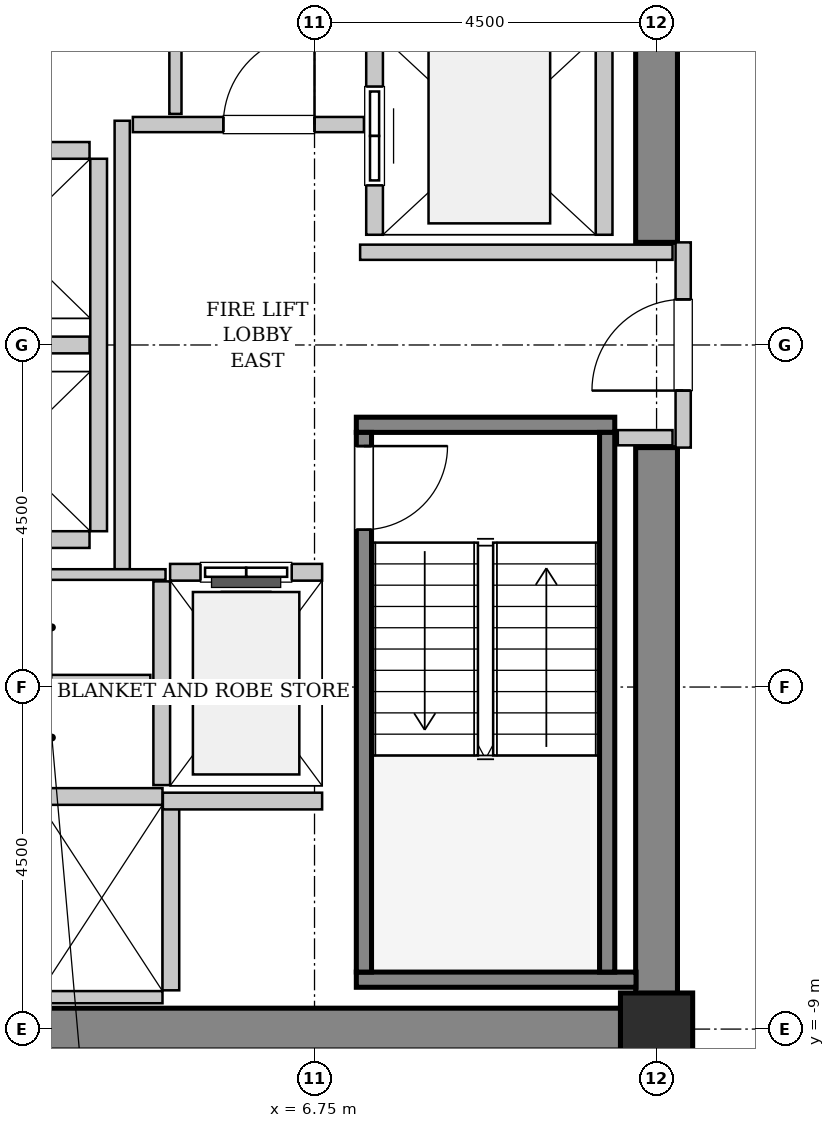
"""IFC4 building model, lengths in metres.
Left out: names, types, materials, properties, quantities, classifications, styles, units other than length and angle.
Written with IfcOpenShell. Run it as: python <this file> out.ifc"""

import sys

from ifc_helpers import new_model, si_unit, direction, frame, frame_2d, origin, origin_2d, place, context, subcontext, project, spatial, rectangle, hollow_rectangle, extrude, source, transform, mapped, element, fill, save


model = new_model("IFC4")
c1 = context("Model", 3, precision=1e-05, world=origin(), true_north=direction((0.0, 1.0)))
c2 = subcontext(c1, "Body", "Model", "MODEL_VIEW")
j1 = project(units=[si_unit("LENGTHUNIT", "METRE"), si_unit("PLANEANGLEUNIT", "RADIAN")], contexts=[c1])
p1 = place(None, origin())
s1 = spatial("IfcSite", under=j1, at=p1, CompositionType="ELEMENT")
p2 = place(p1, origin())
s2 = spatial("IfcBuilding", under=s1, at=p2, CompositionType="ELEMENT")
p3 = place(p2, frame((0.0, 0.0, 125.0)))
s3 = spatial("IfcBuildingStorey", under=s2, at=p3, CompositionType="ELEMENT", Elevation=125.0)
m1 = source(origin(), c2, "Body", "SweptSolid", [
    extrude(rectangle(XDim=9.975, YDim=0.55, at=frame_2d((4.987, 0.0))), origin(), (0.0, 0.0, 1.0), 3.8),
])
p4 = place(p3, frame((1.55, -9.0, 0.0), z_axis=(0.0, 0.0, 1.0), x_axis=(1.0, 0.0, 0.0)))
e1 = element("IfcWall", 1, at=p4, inside=s3, PredefinedType="SHEAR", context=c2, shape_type="MappedRepresentation", body=[
    mapped(m1, transform((0.0, 0.0, 0.0), x_axis=(1.0, 0.0, 0.0), y_axis=(0.0, 1.0, 0.0), z_axis=(0.0, 0.0, 1.0), scale=1.0)),
])
m2 = source(origin(), c2, "Body", "SweptSolid", [
    extrude(rectangle(XDim=7.375, YDim=0.55, at=frame_2d((3.688, 0.0))), origin(), (0.0, 0.0, 1.0), 3.8),
])
for number, where, z_axis, x_axis in (
    (2, (11.25, -8.725, 0.0), (0.0, 0.0, 1.0), (0.0, 1.0, 0.0)),
    (3, (11.25, 1.35, 0.0), (0.0, 0.0, 1.0), (0.0, 1.0, 0.0)),
):
    element("IfcWall", number, at=place(p3, frame(where, z_axis=z_axis, x_axis=x_axis)), inside=s3, PredefinedType="SHEAR", context=c2, shape_type="MappedRepresentation", body=[
        mapped(m2, transform((0.0, 0.0, 0.0), x_axis=(1.0, 0.0, 0.0), y_axis=(0.0, 1.0, 0.0), z_axis=(0.0, 0.0, 1.0), scale=1.0)),
    ])
m3 = source(origin(), c2, "Body", "SweptSolid", [
    extrude(hollow_rectangle(XDim=0.95, YDim=0.95, WallThickness=0.045, InnerFilletRadius=0.045, OuterFilletRadius=0.09, at=origin_2d()), origin(), (0.0, 0.0, 1.0), 3.8),
])
p5 = place(p3, frame((11.25, -9.0, 0.0), z_axis=(0.0, 0.0, 1.0), x_axis=(1.0, 0.0, 0.0)))
e4 = element("IfcColumn", 4, at=p5, inside=s3, PredefinedType="COLUMN", context=c2, shape_type="MappedRepresentation", body=[
    mapped(m3, transform((0.0, 0.0, 0.0), x_axis=(1.0, 0.0, 0.0), y_axis=(0.0, 1.0, 0.0), z_axis=(0.0, 0.0, 1.0), scale=1.0)),
])
m4 = source(origin(), c2, "Body", "SweptSolid", [
    extrude(rectangle(XDim=3.4, YDim=0.2, at=frame_2d((1.7, 0.0))), origin(), (0.0, 0.0, 1.0), 3.8),
])
p6 = place(p3, frame((7.3, -1.05, 0.0), z_axis=(0.0, 0.0, 1.0), x_axis=(1.0, 0.0, 0.0)))
e5 = element("IfcWall", 5, at=p6, inside=s3, PredefinedType="SOLIDWALL", context=c2, shape_type="MappedRepresentation", body=[
    mapped(m4, transform((0.0, 0.0, 0.0), x_axis=(1.0, 0.0, 0.0), y_axis=(0.0, 1.0, 0.0), z_axis=(0.0, 0.0, 1.0), scale=1.0)),
])
m5 = source(origin(), c2, "Body", "SweptSolid", [
    extrude(rectangle(XDim=3.68, YDim=0.2, at=frame_2d((1.84, 0.0))), origin(), (0.0, 0.0, 1.0), 3.8),
])
p7 = place(p3, frame((7.3, -8.35, 0.0), z_axis=(0.0, 0.0, 1.0), x_axis=(1.0, 0.0, 0.0)))
e6 = element("IfcWall", 6, at=p7, inside=s3, PredefinedType="SOLIDWALL", context=c2, shape_type="MappedRepresentation", body=[
    mapped(m5, transform((0.0, 0.0, 0.0), x_axis=(1.0, 0.0, 0.0), y_axis=(0.0, 1.0, 0.0), z_axis=(0.0, 0.0, 1.0), scale=1.0)),
])
m6 = source(origin(), c2, "Body", "SweptSolid", [
    extrude(rectangle(XDim=7.1, YDim=0.2, at=frame_2d((3.55, 0.0))), origin(), (0.0, 0.0, 1.0), 3.8),
])
p8 = place(p3, frame((7.4, -1.15, 0.0), z_axis=(0.0, 0.0, 1.0), x_axis=(0.0, -1.0, 0.0)))
e7 = element("IfcWall", 7, at=p8, inside=s3, PredefinedType="SOLIDWALL", context=c2, shape_type="MappedRepresentation", body=[
    mapped(m6, transform((0.0, 0.0, 0.0), x_axis=(1.0, 0.0, 0.0), y_axis=(0.0, 1.0, 0.0), z_axis=(0.0, 0.0, 1.0), scale=1.0)),
])
p9 = place(p8, frame((0.18, 0.0, 0.0)))
e8 = element("IfcOpeningElement", 8, at=p9, cuts=e7, PredefinedType="OPENING", context=c2, shape_type="SweptSolid", body=[
    extrude(rectangle(XDim=1.1, YDim=2.15, at=frame_2d((0.55, 1.075))), frame((0.0, 0.11, 0.0), z_axis=(0.0, -1.0, 0.0), x_axis=(1.0, 0.0, 0.0)), (0.0, 0.0, 1.0), 0.22),
])
p10 = place(p3, frame((10.6, -1.15, 0.0), z_axis=(0.0, 0.0, 1.0), x_axis=(0.0, -1.0, 0.0)))
e9 = element("IfcWall", 9, at=p10, inside=s3, PredefinedType="SOLIDWALL", context=c2, shape_type="MappedRepresentation", body=[
    mapped(m6, transform((0.0, 0.0, 0.0), x_axis=(1.0, 0.0, 0.0), y_axis=(0.0, 1.0, 0.0), z_axis=(0.0, 0.0, 1.0), scale=1.0)),
])
m7 = source(origin(), c2, "Body", "SweptSolid", [
    extrude(rectangle(XDim=2.0, YDim=0.22, at=frame_2d((1.0, 0.0))), origin(), (0.0, 0.0, 1.0), 3.535),
])
p11 = place(p3, frame((6.85, -2.99, 0.0), z_axis=(0.0, 0.0, 1.0), x_axis=(-1.0, 0.0, 0.0)))
e10 = element("IfcWall", 10, at=p11, inside=s3, PredefinedType="SOLIDWALL", context=c2, shape_type="MappedRepresentation", body=[
    mapped(m7, transform((0.0, 0.0, 0.0), x_axis=(1.0, 0.0, 0.0), y_axis=(0.0, 1.0, 0.0), z_axis=(0.0, 0.0, 1.0), scale=1.0)),
])
p12 = place(p11, frame((0.4, 0.0, 0.0)))
e11 = element("IfcOpeningElement", 11, at=p12, cuts=e10, PredefinedType="OPENING", context=c2, shape_type="SweptSolid", body=[
    extrude(rectangle(XDim=1.2, YDim=2.2, at=frame_2d((0.6, 1.1))), frame((0.0, 0.12, 0.0), z_axis=(0.0, -1.0, 0.0), x_axis=(1.0, 0.0, 0.0)), (0.0, 0.0, 1.0), 0.24),
])
m8 = source(origin(), c2, "Body", "SweptSolid", [
    extrude(rectangle(XDim=2.68, YDim=0.22, at=frame_2d((1.34, 0.0))), origin(), (0.0, 0.0, 1.0), 3.535),
])
p13 = place(p3, frame((4.74, -3.11, 0.0), z_axis=(0.0, 0.0, 1.0), x_axis=(0.0, -1.0, 0.0)))
e12 = element("IfcWall", 12, at=p13, inside=s3, PredefinedType="SOLIDWALL", context=c2, shape_type="MappedRepresentation", body=[
    mapped(m8, transform((0.0, 0.0, 0.0), x_axis=(1.0, 0.0, 0.0), y_axis=(0.0, 1.0, 0.0), z_axis=(0.0, 0.0, 1.0), scale=1.0)),
])
m9 = source(origin(), c2, "Body", "SweptSolid", [
    extrude(rectangle(XDim=5.45, YDim=0.22, at=frame_2d((2.725, 0.0))), origin(), (0.0, 0.0, 1.0), 3.535),
])
p14 = place(p3, frame((7.54, 6.9, 0.0), z_axis=(0.0, 0.0, 1.0), x_axis=(0.0, -1.0, 0.0)))
e13 = element("IfcWall", 13, at=p14, inside=s3, PredefinedType="SOLIDWALL", context=c2, shape_type="MappedRepresentation", body=[
    mapped(m9, transform((0.0, 0.0, 0.0), x_axis=(1.0, 0.0, 0.0), y_axis=(0.0, 1.0, 0.0), z_axis=(0.0, 0.0, 1.0), scale=1.0)),
])
p15 = place(p14, frame((3.5, 0.0, 0.0)))
e14 = element("IfcOpeningElement", 14, at=p15, cuts=e13, PredefinedType="OPENING", context=c2, shape_type="SweptSolid", body=[
    extrude(rectangle(XDim=1.3, YDim=2.3, at=frame_2d((0.65, 1.15))), frame((0.0, 0.12, 0.0), z_axis=(0.0, -1.0, 0.0), x_axis=(1.0, 0.0, 0.0)), (0.0, 0.0, 1.0), 0.24),
])
p16 = place(p14, frame((0.65, 0.0, 0.0)))
e15 = element("IfcOpeningElement", 15, at=p16, cuts=e13, PredefinedType="OPENING", context=c2, shape_type="SweptSolid", body=[
    extrude(rectangle(XDim=1.3, YDim=2.3, at=frame_2d((0.65, 1.15))), frame((0.0, 0.12, 0.0), z_axis=(0.0, -1.0, 0.0), x_axis=(1.0, 0.0, 0.0)), (0.0, 0.0, 1.0), 0.24),
])
p17 = place(p3, frame((10.56, 1.45, 0.0), z_axis=(0.0, 0.0, 1.0), x_axis=(0.0, 1.0, 0.0)))
e16 = element("IfcWall", 16, at=p17, inside=s3, PredefinedType="SOLIDWALL", context=c2, shape_type="MappedRepresentation", body=[
    mapped(m9, transform((0.0, 0.0, 0.0), x_axis=(1.0, 0.0, 0.0), y_axis=(0.0, 1.0, 0.0), z_axis=(0.0, 0.0, 1.0), scale=1.0)),
])
m10 = source(origin(), c2, "Body", "SweptSolid", [
    extrude(rectangle(XDim=3.2, YDim=0.22, at=frame_2d((1.6, 0.0))), origin(), (0.0, 0.0, 1.0), 3.535),
])
p18 = place(p3, frame((4.75, -5.94, 0.0), z_axis=(0.0, 0.0, 1.0), x_axis=(-1.0, 0.0, 0.0)))
e17 = element("IfcWall", 17, at=p18, inside=s3, PredefinedType="SOLIDWALL", context=c2, shape_type="MappedRepresentation", body=[
    mapped(m10, transform((0.0, 0.0, 0.0), x_axis=(1.0, 0.0, 0.0), y_axis=(0.0, 1.0, 0.0), z_axis=(0.0, 0.0, 1.0), scale=1.0)),
])
m11 = source(origin(), c2, "Body", "SweptSolid", [
    extrude(rectangle(XDim=3.2, YDim=0.16, at=frame_2d((1.6, 0.0))), origin(), (0.0, 0.0, 1.0), 2.425),
])
p19 = place(p3, frame((1.55, -8.58, 0.0), z_axis=(0.0, 0.0, 1.0), x_axis=(1.0, 0.0, 0.0)))
e18 = element("IfcWall", 18, at=p19, inside=s3, PredefinedType="PARTITIONING", context=c2, shape_type="MappedRepresentation", body=[
    mapped(m11, transform((0.0, 0.0, 0.0), x_axis=(1.0, 0.0, 0.0), y_axis=(0.0, 1.0, 0.0), z_axis=(0.0, 0.0, 1.0), scale=1.0)),
])
m12 = source(origin(), c2, "Body", "SweptSolid", [
    extrude(rectangle(XDim=2.43, YDim=0.22, at=frame_2d((1.215, 0.0))), origin(), (0.0, 0.0, 1.0), 3.535),
])
p20 = place(p3, frame((4.86, -8.49, 0.0), z_axis=(0.0, 0.0, 1.0), x_axis=(0.0, 1.0, 0.0)))
e19 = element("IfcWall", 19, at=p20, inside=s3, PredefinedType="SOLIDWALL", context=c2, shape_type="MappedRepresentation", body=[
    mapped(m12, transform((0.0, 0.0, 0.0), x_axis=(1.0, 0.0, 0.0), y_axis=(0.0, 1.0, 0.0), z_axis=(0.0, 0.0, 1.0), scale=1.0)),
])
m13 = source(origin(), c2, "Body", "SweptSolid", [
    extrude(rectangle(XDim=4.9, YDim=0.22, at=frame_2d((2.45, 0.0))), origin(), (0.0, 0.0, 1.0), 3.535),
])
p21 = place(p3, frame((3.91, -2.45, 0.0), z_axis=(0.0, 0.0, 1.0), x_axis=(0.0, 1.0, 0.0)))
e20 = element("IfcWall", 20, at=p21, inside=s3, PredefinedType="SOLIDWALL", context=c2, shape_type="MappedRepresentation", body=[
    mapped(m13, transform((0.0, 0.0, 0.0), x_axis=(1.0, 0.0, 0.0), y_axis=(0.0, 1.0, 0.0), z_axis=(0.0, 0.0, 1.0), scale=1.0)),
])
m14 = source(origin(), c2, "Body", "SweptSolid", [
    extrude(rectangle(XDim=2.13, YDim=0.22, at=frame_2d((1.065, 0.0))), origin(), (0.0, 0.0, 1.0), 3.535),
])
for number, where, z_axis, x_axis in (
    (21, (1.66, -2.56, 0.0), (0.0, 0.0, 1.0), (1.0, 0.0, 0.0)),
    (22, (1.66, 0.0, 0.0), (0.0, 0.0, 1.0), (1.0, 0.0, 0.0)),
    (23, (3.79, 2.56, 0.0), (0.0, 0.0, 1.0), (-1.0, 0.0, 0.0)),
):
    element("IfcWall", number, at=place(p3, frame(where, z_axis=z_axis, x_axis=x_axis)), inside=s3, PredefinedType="SOLIDWALL", context=c2, shape_type="MappedRepresentation", body=[
        mapped(m14, transform((0.0, 0.0, 0.0), x_axis=(1.0, 0.0, 0.0), y_axis=(0.0, 1.0, 0.0), z_axis=(0.0, 0.0, 1.0), scale=1.0)),
    ])
m15 = source(origin(), c2, "Body", "SweptSolid", [
    extrude(rectangle(XDim=2.095, YDim=0.22, at=frame_2d((1.048, 0.0))), origin(), (0.0, 0.0, 1.0), 3.535),
])
p22 = place(p3, frame((4.755, -6.0, 0.0), z_axis=(0.0, 0.0, 1.0), x_axis=(1.0, 0.0, 0.0)))
e24 = element("IfcWall", 24, at=p22, inside=s3, PredefinedType="SOLIDWALL", context=c2, shape_type="MappedRepresentation", body=[
    mapped(m15, transform((0.0, 0.0, 0.0), x_axis=(1.0, 0.0, 0.0), y_axis=(0.0, 1.0, 0.0), z_axis=(0.0, 0.0, 1.0), scale=1.0)),
])
m16 = source(origin(), c2, "Body", "SweptSolid", [
    extrude(rectangle(XDim=2.7, YDim=0.2, at=frame_2d((1.35, 0.0))), origin(), (0.0, 0.0, 1.0), 2.425),
])
p23 = place(p3, frame((11.6, -1.35, 0.0), z_axis=(0.0, 0.0, 1.0), x_axis=(0.0, 1.0, 0.0)))
e25 = element("IfcWall", 25, at=p23, inside=s3, PredefinedType="PARTITIONING", context=c2, shape_type="MappedRepresentation", body=[
    mapped(m16, transform((0.0, 0.0, 0.0), x_axis=(1.0, 0.0, 0.0), y_axis=(0.0, 1.0, 0.0), z_axis=(0.0, 0.0, 1.0), scale=1.0)),
])
p24 = place(p23, frame((0.75, 0.0, 0.0)))
e26 = element("IfcOpeningElement", 26, at=p24, cuts=e25, PredefinedType="OPENING", context=c2, shape_type="SweptSolid", body=[
    extrude(rectangle(XDim=1.2, YDim=2.15, at=frame_2d((0.6, 1.075))), frame((0.0, 0.11, 0.0), z_axis=(0.0, -1.0, 0.0), x_axis=(1.0, 0.0, 0.0)), (0.0, 0.0, 1.0), 0.22),
])
m17 = source(origin(), c2, "Body", "SweptSolid", [
    extrude(rectangle(XDim=5.9, YDim=0.2, at=frame_2d((2.95, 0.0))), origin(), (0.0, 0.0, 1.0), 3.535),
])
p25 = place(p3, frame((4.22, -2.95, 0.0), z_axis=(0.0, 0.0, 1.0), x_axis=(0.0, 1.0, 0.0)))
e27 = element("IfcWall", 27, at=p25, inside=s3, PredefinedType="PARTITIONING", context=c2, shape_type="MappedRepresentation", body=[
    mapped(m17, transform((0.0, 0.0, 0.0), x_axis=(1.0, 0.0, 0.0), y_axis=(0.0, 1.0, 0.0), z_axis=(0.0, 0.0, 1.0), scale=1.0)),
])
m18 = source(origin(), c2, "Body", "SweptSolid", [
    extrude(rectangle(XDim=3.04, YDim=0.2, at=frame_2d((1.52, 0.0))), origin(), (0.0, 0.0, 1.0), 3.535),
])
p26 = place(p3, frame((4.36, 2.9, 0.0), z_axis=(0.0, 0.0, 1.0), x_axis=(1.0, 0.0, 0.0)))
e28 = element("IfcWall", 28, at=p26, inside=s3, PredefinedType="PARTITIONING", context=c2, shape_type="MappedRepresentation", body=[
    mapped(m18, transform((0.0, 0.0, 0.0), x_axis=(1.0, 0.0, 0.0), y_axis=(0.0, 1.0, 0.0), z_axis=(0.0, 0.0, 1.0), scale=1.0)),
])
p27 = place(p26, frame((1.19, 0.0, 0.0)))
e29 = element("IfcOpeningElement", 29, at=p27, cuts=e28, PredefinedType="OPENING", context=c2, shape_type="SweptSolid", body=[
    extrude(rectangle(XDim=1.2, YDim=2.15, at=frame_2d((0.6, 1.075))), frame((0.0, 0.11, 0.0), z_axis=(0.0, -1.0, 0.0), x_axis=(1.0, 0.0, 0.0)), (0.0, 0.0, 1.0), 0.22),
])
m19 = source(origin(), c2, "Body", "SweptSolid", [
    extrude(rectangle(XDim=4.11, YDim=0.2, at=frame_2d((2.055, 0.0))), origin(), (0.0, 0.0, 1.0), 3.535),
])
p28 = place(p3, frame((7.35, 1.22, 0.0), z_axis=(0.0, 0.0, 1.0), x_axis=(1.0, 0.0, 0.0)))
e30 = element("IfcWall", 30, at=p28, inside=s3, PredefinedType="PARTITIONING", context=c2, shape_type="MappedRepresentation", body=[
    mapped(m19, transform((0.0, 0.0, 0.0), x_axis=(1.0, 0.0, 0.0), y_axis=(0.0, 1.0, 0.0), z_axis=(0.0, 0.0, 1.0), scale=1.0)),
])
m20 = source(origin(), c2, "Body", "SweptSolid", [
    extrude(rectangle(XDim=0.72, YDim=0.2, at=frame_2d((0.36, 0.0))), origin(), (0.0, 0.0, 1.0), 3.535),
])
p29 = place(p3, frame((10.74, -1.22, 0.0), z_axis=(0.0, 0.0, 1.0), x_axis=(1.0, 0.0, 0.0)))
e31 = element("IfcWall", 31, at=p29, inside=s3, PredefinedType="PARTITIONING", context=c2, shape_type="MappedRepresentation", body=[
    mapped(m20, transform((0.0, 0.0, 0.0), x_axis=(1.0, 0.0, 0.0), y_axis=(0.0, 1.0, 0.0), z_axis=(0.0, 0.0, 1.0), scale=1.0)),
])
m21 = source(origin(), c2, "Body", "SweptSolid", [
    extrude(rectangle(XDim=3.015, YDim=0.16, at=frame_2d((1.507, 0.0))), origin(), (0.0, 0.0, 1.0), 3.535),
])
p30 = place(p3, frame((4.92, 3.04, 0.0), z_axis=(0.0, 0.0, 1.0), x_axis=(0.0, 1.0, 0.0)))
e32 = element("IfcWall", 32, at=p30, inside=s3, PredefinedType="PARTITIONING", context=c2, shape_type="MappedRepresentation", body=[
    mapped(m21, transform((0.0, 0.0, 0.0), x_axis=(1.0, 0.0, 0.0), y_axis=(0.0, 1.0, 0.0), z_axis=(0.0, 0.0, 1.0), scale=1.0)),
])
m22 = source(origin(), c2, "Body", "SweptSolid", [
    extrude(rectangle(XDim=3.15, YDim=0.14, at=frame_2d((1.575, 0.0))), origin(), (0.0, 0.0, 1.0), 3.535),
])
p31 = place(p3, frame((1.64, -3.02, 0.0), z_axis=(0.0, 0.0, 1.0), x_axis=(1.0, 0.0, 0.0)))
e33 = element("IfcWall", 33, at=p31, inside=s3, PredefinedType="PARTITIONING", context=c2, shape_type="MappedRepresentation", body=[
    mapped(m22, transform((0.0, 0.0, 0.0), x_axis=(1.0, 0.0, 0.0), y_axis=(0.0, 1.0, 0.0), z_axis=(0.0, 0.0, 1.0), scale=1.0)),
])
m23 = source(origin(), c2, "Body", "SweptSolid", [
    extrude(rectangle(XDim=2.95, YDim=0.14, at=frame_2d((1.475, 0.0))), origin(), (0.0, 0.0, 1.0), 3.535),
])
p32 = place(p3, frame((1.64, -4.41, 0.0), z_axis=(0.0, 0.0, 1.0), x_axis=(1.0, 0.0, 0.0)))
e34 = element("IfcWall", 34, at=p32, inside=s3, PredefinedType="PARTITIONING", context=c2, shape_type="MappedRepresentation", body=[
    mapped(m23, transform((0.0, 0.0, 0.0), x_axis=(1.0, 0.0, 0.0), y_axis=(0.0, 1.0, 0.0), z_axis=(0.0, 0.0, 1.0), scale=1.0)),
])
m24 = source(origin(), c2, "Body", "SweptSolid", [
    extrude(rectangle(XDim=1.1, YDim=2.15, at=frame_2d((0.55, 1.075))), frame((0.0, 0.025, 0.0), z_axis=(0.0, -1.0, 0.0), x_axis=(1.0, 0.0, 0.0)), (0.0, 0.0, 1.0), 0.05),
])
p33 = place(p9, origin())
e35 = element("IfcDoor", 35, at=p33, inside=s3, OperationType="SINGLE_SWING_LEFT", PredefinedType="DOOR", context=c2, shape_type="MappedRepresentation", body=[
    mapped(m24, transform((0.0, 0.0, 0.0), x_axis=(1.0, 0.0, 0.0), y_axis=(0.0, 1.0, 0.0), z_axis=(0.0, 0.0, 1.0), scale=1.0)),
])
fill(e8, e35)
m25 = source(origin(), c2, "Body", "SweptSolid", [
    extrude(rectangle(XDim=1.2, YDim=2.2, at=frame_2d((0.6, 1.1))), frame((0.0, 0.025, 0.0), z_axis=(0.0, -1.0, 0.0), x_axis=(1.0, 0.0, 0.0)), (0.0, 0.0, 1.0), 0.05),
])
p34 = place(p12, origin())
e36 = element("IfcDoor", 36, at=p34, inside=s3, OperationType="SLIDING_TO_LEFT", PredefinedType="DOOR", context=c2, shape_type="MappedRepresentation", body=[
    mapped(m25, transform((0.0, 0.0, 0.0), x_axis=(1.0, 0.0, 0.0), y_axis=(0.0, 1.0, 0.0), z_axis=(0.0, 0.0, 1.0), scale=1.0)),
])
fill(e11, e36)
m26 = source(origin(), c2, "Body", "SweptSolid", [
    extrude(rectangle(XDim=1.3, YDim=2.3, at=frame_2d((0.65, 1.15))), frame((0.0, 0.025, 0.0), z_axis=(0.0, -1.0, 0.0), x_axis=(1.0, 0.0, 0.0)), (0.0, 0.0, 1.0), 0.05),
])
p35 = place(p15, origin())
e37 = element("IfcDoor", 37, at=p35, inside=s3, OperationType="SLIDING_TO_RIGHT", PredefinedType="DOOR", context=c2, shape_type="MappedRepresentation", body=[
    mapped(m26, transform((0.0, 0.0, 0.0), x_axis=(1.0, 0.0, 0.0), y_axis=(0.0, 1.0, 0.0), z_axis=(0.0, 0.0, 1.0), scale=1.0)),
])
fill(e14, e37)
m27 = source(origin(), c2, "Body", "SweptSolid", [
    extrude(rectangle(XDim=1.2, YDim=2.15, at=frame_2d((0.6, 1.075))), frame((0.0, 0.025, 0.0), z_axis=(0.0, -1.0, 0.0), x_axis=(1.0, 0.0, 0.0)), (0.0, 0.0, 1.0), 0.05),
])
p36 = place(p24, origin())
e38 = element("IfcDoor", 38, at=p36, inside=s3, OperationType="SINGLE_SWING_LEFT", PredefinedType="DOOR", context=c2, shape_type="MappedRepresentation", body=[
    mapped(m27, transform((0.0, 0.0, 0.0), x_axis=(1.0, 0.0, 0.0), y_axis=(0.0, 1.0, 0.0), z_axis=(0.0, 0.0, 1.0), scale=1.0)),
])
fill(e26, e38)
p37 = place(p27, origin())
e39 = element("IfcDoor", 39, at=p37, inside=s3, OperationType="SINGLE_SWING_RIGHT", PredefinedType="DOOR", context=c2, shape_type="MappedRepresentation", body=[
    mapped(m27, transform((0.0, 0.0, 0.0), x_axis=(1.0, 0.0, 0.0), y_axis=(0.0, 1.0, 0.0), z_axis=(0.0, 0.0, 1.0), scale=1.0)),
])
fill(e29, e39)
save(model, sys.argv[1])
